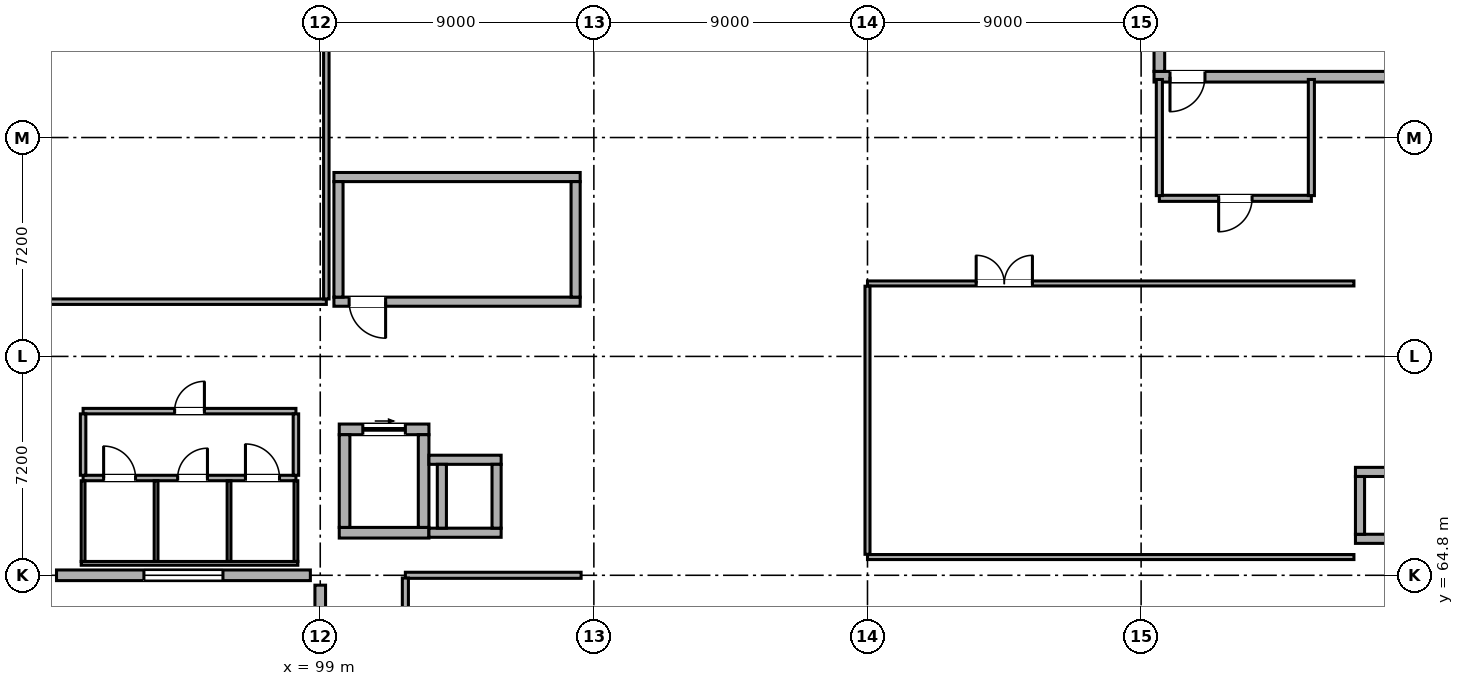
"""IFC4 building model, lengths in metres.
Left out: names, types, materials, properties, quantities, classifications, styles, units other than length and angle.
Written with IfcOpenShell. Run it as: python <this file> out.ifc"""

import sys

from ifc_helpers import new_model, si_unit, direction, frame, frame_2d, origin, origin_2d, place, context, subcontext, project, spatial, rectangle, hollow_rectangle, extrude, element, fill, save


model = new_model("IFC4")
c1 = context("Model", 3, precision=1e-05, world=origin(), true_north=direction((0.0, 1.0)))
c2 = subcontext(c1, "Body", "Model", "MODEL_VIEW")
j1 = project(units=[si_unit("LENGTHUNIT", "METRE"), si_unit("PLANEANGLEUNIT", "RADIAN")], contexts=[c1])
p1 = place(None, origin())
s1 = spatial("IfcSite", under=j1, at=p1, CompositionType="ELEMENT")
p2 = place(p1, origin())
s2 = spatial("IfcBuilding", under=s1, at=p2, CompositionType="ELEMENT")
p3 = place(p2, origin())
s3 = spatial("IfcBuildingStorey", under=s2, at=p3, CompositionType="ELEMENT", Elevation=0.0)
for number, where, z_axis, x_axis in (
    (1, (90.0, 64.8, 0.0), (0.0, 0.0, 1.0), (1.0, 0.0, 0.0)),
    (2, (90.0, 72.0, 0.0), (0.0, 0.0, 1.0), (1.0, 0.0, 0.0)),
    (3, (90.0, 79.2, 0.0), (0.0, 0.0, 1.0), (1.0, 0.0, 0.0)),
    (4, (99.0, 64.8, 0.0), (0.0, 0.0, 1.0), (1.0, 0.0, 0.0)),
    (5, (99.0, 72.0, 0.0), (0.0, 0.0, 1.0), (1.0, 0.0, 0.0)),
    (6, (99.0, 79.2, 0.0), (0.0, 0.0, 1.0), (1.0, 0.0, 0.0)),
):
    element("IfcColumn", number, at=place(p3, frame(where, z_axis=z_axis, x_axis=x_axis)), inside=s3, PredefinedType="COLUMN", context=c2, shape_type="SweptSolid", body=[
        extrude(hollow_rectangle(XDim=0.65, YDim=0.65, WallThickness=0.025, at=origin_2d()), origin(), (0.0, 0.0, 1.0), 4.8),
    ])
for number, where, z_axis, x_axis in (
    (7, (108.0, 64.8, 0.0), (0.0, 0.0, 1.0), (1.0, 0.0, 0.0)),
    (8, (108.0, 72.0, 0.0), (0.0, 0.0, 1.0), (1.0, 0.0, 0.0)),
    (9, (108.0, 79.2, 0.0), (0.0, 0.0, 1.0), (1.0, 0.0, 0.0)),
):
    element("IfcColumn", number, at=place(p3, frame(where, z_axis=z_axis, x_axis=x_axis)), inside=s3, PredefinedType="COLUMN", context=c2, shape_type="SweptSolid", body=[
        extrude(hollow_rectangle(XDim=0.5, YDim=0.5, WallThickness=0.022, at=origin_2d()), origin(), (0.0, 0.0, 1.0), 4.8),
    ])
for number, where, z_axis, x_axis in (
    (10, (117.0, 64.8, 0.0), (0.0, 0.0, 1.0), (1.0, 0.0, 0.0)),
    (11, (117.0, 72.0, 0.0), (0.0, 0.0, 1.0), (1.0, 0.0, 0.0)),
    (12, (117.0, 79.2, 0.0), (0.0, 0.0, 1.0), (1.0, 0.0, 0.0)),
):
    element("IfcColumn", number, at=place(p3, frame(where, z_axis=z_axis, x_axis=x_axis)), inside=s3, PredefinedType="COLUMN", context=c2, shape_type="SweptSolid", body=[
        extrude(hollow_rectangle(XDim=0.7, YDim=0.7, WallThickness=0.028, at=origin_2d()), origin(), (0.0, 0.0, 1.0), 4.8),
    ])
for number, where, z_axis, x_axis in (
    (13, (126.0, 64.8, 0.0), (0.0, 0.0, 1.0), (1.0, 0.0, 0.0)),
    (14, (126.0, 72.0, 0.0), (0.0, 0.0, 1.0), (1.0, 0.0, 0.0)),
    (15, (126.0, 79.2, 0.0), (0.0, 0.0, 1.0), (1.0, 0.0, 0.0)),
):
    element("IfcColumn", number, at=place(p3, frame(where, z_axis=z_axis, x_axis=x_axis)), inside=s3, PredefinedType="COLUMN", context=c2, shape_type="SweptSolid", body=[
        extrude(hollow_rectangle(XDim=0.75, YDim=0.75, WallThickness=0.032, at=origin_2d()), origin(), (0.0, 0.0, 1.0), 4.8),
    ])
p4 = place(p3, frame((90.325, 64.8, 0.0), z_axis=(0.0, 0.0, 1.0), x_axis=(1.0, 0.0, 0.0)))
e16 = element("IfcWall", 16, at=p4, inside=s3, PredefinedType="STANDARD", context=c2, shape_type="SweptSolid", body=[
    extrude(rectangle(XDim=8.35, YDim=0.35, at=frame_2d((4.175, 0.0))), origin(), (0.0, 0.0, 1.0), 4.055),
])
p5 = place(p4, frame((2.875, 0.0, 0.85)))
e17 = element("IfcOpeningElement", 17, at=p5, cuts=e16, PredefinedType="OPENING", context=c2, shape_type="SweptSolid", body=[
    extrude(rectangle(XDim=2.6, YDim=1.6, at=frame_2d((1.3, 0.8))), frame((0.0, 0.187, 0.0), z_axis=(0.0, -1.0, 0.0), x_axis=(1.0, 0.0, 0.0)), (0.0, 0.0, 1.0), 0.374),
])
p6 = place(p3, frame((99.0, 57.925, 0.0), z_axis=(0.0, 0.0, 1.0), x_axis=(0.0, 1.0, 0.0)))
e18 = element("IfcWall", 18, at=p6, inside=s3, PredefinedType="STANDARD", context=c2, shape_type="SweptSolid", body=[
    extrude(rectangle(XDim=6.55, YDim=0.35, at=frame_2d((3.275, 0.0))), origin(), (0.0, 0.0, 1.0), 4.055),
])
p7 = place(p6, frame((1.975, 0.0, 0.85)))
e19 = element("IfcOpeningElement", 19, at=p7, cuts=e18, PredefinedType="OPENING", context=c2, shape_type="SweptSolid", body=[
    extrude(rectangle(XDim=2.6, YDim=1.6, at=frame_2d((1.3, 0.8))), frame((0.0, 0.187, 0.0), z_axis=(0.0, -1.0, 0.0), x_axis=(1.0, 0.0, 0.0)), (0.0, 0.0, 1.0), 0.374),
])
p8 = place(p3, frame((126.425, 81.2, 0.0), z_axis=(0.0, 0.0, 1.0), x_axis=(1.0, 0.0, 0.0)))
e20 = element("IfcWall", 20, at=p8, inside=s3, PredefinedType="SHEAR", context=c2, shape_type="SweptSolid", body=[
    extrude(rectangle(XDim=8.15, YDim=0.35, at=frame_2d((4.075, 0.0))), origin(), (0.0, 0.0, 1.0), 4.555),
])
p9 = place(p8, frame((0.525, 0.0, 0.0)))
e21 = element("IfcOpeningElement", 21, at=p9, cuts=e20, PredefinedType="OPENING", context=c2, shape_type="SweptSolid", body=[
    extrude(rectangle(XDim=1.15, YDim=2.1, at=frame_2d((0.575, 1.05))), frame((0.0, 0.187, 0.0), z_axis=(0.0, -1.0, 0.0), x_axis=(1.0, 0.0, 0.0)), (0.0, 0.0, 1.0), 0.374),
])
p10 = place(p3, frame((126.6, 81.375, 0.0), z_axis=(0.0, 0.0, 1.0), x_axis=(0.0, 1.0, 0.0)))
e22 = element("IfcWall", 22, at=p10, inside=s3, PredefinedType="SHEAR", context=c2, shape_type="SweptSolid", body=[
    extrude(rectangle(XDim=3.55, YDim=0.35, at=frame_2d((1.775, 0.0))), origin(), (0.0, 0.0, 1.0), 4.555),
])
p11 = place(p3, frame((99.45, 73.8, 0.0), z_axis=(0.0, 0.0, 1.0), x_axis=(1.0, 0.0, 0.0)))
e23 = element("IfcWall", 23, at=p11, inside=s3, PredefinedType="SHEAR", context=c2, shape_type="SweptSolid", body=[
    extrude(rectangle(XDim=8.1, YDim=0.3, at=frame_2d((4.05, 0.0))), origin(), (0.0, 0.0, 1.0), 4.555),
])
p12 = place(p11, frame((0.5, 0.0, 0.0)))
e24 = element("IfcOpeningElement", 24, at=p12, cuts=e23, PredefinedType="OPENING", context=c2, shape_type="SweptSolid", body=[
    extrude(rectangle(XDim=1.2, YDim=2.1, at=frame_2d((0.6, 1.05))), frame((0.0, 0.162, 0.0), z_axis=(0.0, -1.0, 0.0), x_axis=(1.0, 0.0, 0.0)), (0.0, 0.0, 1.0), 0.324),
])
p13 = place(p3, frame((99.45, 77.9, 0.0), z_axis=(0.0, 0.0, 1.0), x_axis=(1.0, 0.0, 0.0)))
e25 = element("IfcWall", 25, at=p13, inside=s3, PredefinedType="SHEAR", context=c2, shape_type="SweptSolid", body=[
    extrude(rectangle(XDim=8.1, YDim=0.3, at=frame_2d((4.05, 0.0))), origin(), (0.0, 0.0, 1.0), 4.555),
])
for number, where, z_axis, x_axis in (
    (26, (99.6, 73.95, 0.0), (0.0, 0.0, 1.0), (0.0, 1.0, 0.0)),
    (27, (107.4, 73.95, 0.0), (0.0, 0.0, 1.0), (0.0, 1.0, 0.0)),
):
    element("IfcWall", number, at=place(p3, frame(where, z_axis=z_axis, x_axis=x_axis)), inside=s3, PredefinedType="SHEAR", context=c2, shape_type="SweptSolid", body=[
        extrude(rectangle(XDim=3.8, YDim=0.3, at=frame_2d((1.9, 0.0))), origin(), (0.0, 0.0, 1.0), 4.555),
    ])
p14 = place(p3, frame((99.625, 66.2, 0.0), z_axis=(0.0, 0.0, 1.0), x_axis=(1.0, 0.0, 0.0)))
e28 = element("IfcWall", 28, at=p14, inside=s3, PredefinedType="SHEAR", context=c2, shape_type="SweptSolid", body=[
    extrude(rectangle(XDim=2.95, YDim=0.35, at=frame_2d((1.475, 0.0))), origin(), (0.0, 0.0, 1.0), 4.555),
])
p15 = place(p3, frame((99.625, 69.6, 0.0), z_axis=(0.0, 0.0, 1.0), x_axis=(1.0, 0.0, 0.0)))
e29 = element("IfcWall", 29, at=p15, inside=s3, PredefinedType="SHEAR", context=c2, shape_type="SweptSolid", body=[
    extrude(rectangle(XDim=2.95, YDim=0.35, at=frame_2d((1.475, 0.0))), origin(), (0.0, 0.0, 1.0), 4.555),
])
p16 = place(p15, frame((0.775, 0.0, 0.0)))
e30 = element("IfcOpeningElement", 30, at=p16, cuts=e29, PredefinedType="OPENING", context=c2, shape_type="SweptSolid", body=[
    extrude(rectangle(XDim=1.4, YDim=2.15, at=frame_2d((0.7, 1.075))), frame((0.0, 0.187, 0.0), z_axis=(0.0, -1.0, 0.0), x_axis=(1.0, 0.0, 0.0)), (0.0, 0.0, 1.0), 0.374),
])
for number, where, z_axis, x_axis in (
    (31, (99.8, 66.375, 0.0), (0.0, 0.0, 1.0), (0.0, 1.0, 0.0)),
    (32, (102.4, 66.375, 0.0), (0.0, 0.0, 1.0), (0.0, 1.0, 0.0)),
):
    element("IfcWall", number, at=place(p3, frame(where, z_axis=z_axis, x_axis=x_axis)), inside=s3, PredefinedType="SHEAR", context=c2, shape_type="SweptSolid", body=[
        extrude(rectangle(XDim=3.05, YDim=0.35, at=frame_2d((1.525, 0.0))), origin(), (0.0, 0.0, 1.0), 4.555),
    ])
for number, where, z_axis, x_axis in (
    (33, (133.05, 66.0, 0.0), (0.0, 0.0, 1.0), (1.0, 0.0, 0.0)),
    (34, (133.05, 68.2, 0.0), (0.0, 0.0, 1.0), (1.0, 0.0, 0.0)),
):
    element("IfcWall", number, at=place(p3, frame(where, z_axis=z_axis, x_axis=x_axis)), inside=s3, PredefinedType="SHEAR", context=c2, shape_type="SweptSolid", body=[
        extrude(rectangle(XDim=2.1, YDim=0.3, at=frame_2d((1.05, 0.0))), origin(), (0.0, 0.0, 1.0), 4.555),
    ])
p17 = place(p3, frame((133.2, 66.15, 0.0), z_axis=(0.0, 0.0, 1.0), x_axis=(0.0, 1.0, 0.0)))
e35 = element("IfcWall", 35, at=p17, inside=s3, PredefinedType="SHEAR", context=c2, shape_type="SweptSolid", body=[
    extrude(rectangle(XDim=1.9, YDim=0.3, at=frame_2d((0.95, 0.0))), origin(), (0.0, 0.0, 1.0), 4.555),
])
for number, where, z_axis, x_axis in (
    (36, (102.575, 66.2, 0.0), (0.0, 0.0, 1.0), (1.0, 0.0, 0.0)),
    (37, (102.575, 68.6, 0.0), (0.0, 0.0, 1.0), (1.0, 0.0, 0.0)),
):
    element("IfcWall", number, at=place(p3, frame(where, z_axis=z_axis, x_axis=x_axis)), inside=s3, PredefinedType="SHEAR", context=c2, shape_type="SweptSolid", body=[
        extrude(rectangle(XDim=2.375, YDim=0.3, at=frame_2d((1.188, 0.0))), origin(), (0.0, 0.0, 1.0), 4.555),
    ])
for number, where, z_axis, x_axis in (
    (38, (103.0, 66.35, 0.0), (0.0, 0.0, 1.0), (0.0, 1.0, 0.0)),
    (39, (104.8, 66.35, 0.0), (0.0, 0.0, 1.0), (0.0, 1.0, 0.0)),
):
    element("IfcWall", number, at=place(p3, frame(where, z_axis=z_axis, x_axis=x_axis)), inside=s3, PredefinedType="SHEAR", context=c2, shape_type="SweptSolid", body=[
        extrude(rectangle(XDim=2.1, YDim=0.3, at=frame_2d((1.05, 0.0))), origin(), (0.0, 0.0, 1.0), 4.555),
    ])
p18 = place(p3, frame((91.137, 65.192, 0.0), z_axis=(0.0, 0.0, 1.0), x_axis=(1.0, 0.0, 0.0)))
e40 = element("IfcWall", 40, at=p18, inside=s3, PredefinedType="PARTITIONING", context=c2, shape_type="SweptSolid", body=[
    extrude(rectangle(XDim=7.125, YDim=0.125, at=frame_2d((3.562, 0.0))), origin(), (0.0, 0.0, 1.0), 4.555),
])
p19 = place(p3, frame((126.6, 77.2, 0.0), z_axis=(0.0, 0.0, 1.0), x_axis=(1.0, 0.0, 0.0)))
e41 = element("IfcWall", 41, at=p19, inside=s3, PredefinedType="PARTITIONING", context=c2, shape_type="SweptSolid", body=[
    extrude(rectangle(XDim=5.0, YDim=0.2, at=frame_2d((2.5, 0.0))), origin(), (0.0, 0.0, 1.0), 4.555),
])
p20 = place(p19, frame((1.95, 0.0, 0.0)))
e42 = element("IfcOpeningElement", 42, at=p20, cuts=e41, PredefinedType="OPENING", context=c2, shape_type="SweptSolid", body=[
    extrude(rectangle(XDim=1.1, YDim=2.08, at=frame_2d((0.55, 1.04))), frame((0.0, 0.112, 0.0), z_axis=(0.0, -1.0, 0.0), x_axis=(1.0, 0.0, 0.0)), (0.0, 0.0, 1.0), 0.224),
])
for number, where, z_axis, x_axis in (
    (43, (126.6, 77.29, 0.0), (0.0, 0.0, 1.0), (0.0, 1.0, 0.0)),
    (44, (131.6, 77.29, 0.0), (0.0, 0.0, 1.0), (0.0, 1.0, 0.0)),
):
    element("IfcWall", number, at=place(p3, frame(where, z_axis=z_axis, x_axis=x_axis)), inside=s3, PredefinedType="PARTITIONING", context=c2, shape_type="SweptSolid", body=[
        extrude(rectangle(XDim=3.82, YDim=0.2, at=frame_2d((1.91, 0.0))), origin(), (0.0, 0.0, 1.0), 4.555),
    ])
p21 = place(p3, frame((91.2, 68.0, 0.0), z_axis=(0.0, 0.0, 1.0), x_axis=(1.0, 0.0, 0.0)))
e45 = element("IfcWall", 45, at=p21, inside=s3, PredefinedType="PARTITIONING", context=c2, shape_type="SweptSolid", body=[
    extrude(rectangle(XDim=7.0, YDim=0.18, at=frame_2d((3.5, 0.0))), origin(), (0.0, 0.0, 1.0), 4.555),
])
p22 = place(p21, frame((0.675, 0.0, 0.0)))
e46 = element("IfcOpeningElement", 46, at=p22, cuts=e45, PredefinedType="OPENING", context=c2, shape_type="SweptSolid", body=[
    extrude(rectangle(XDim=1.05, YDim=2.1, at=frame_2d((0.525, 1.05))), frame((0.0, 0.102, 0.0), z_axis=(0.0, -1.0, 0.0), x_axis=(1.0, 0.0, 0.0)), (0.0, 0.0, 1.0), 0.204),
])
p23 = place(p21, frame((3.11, 0.0, 0.0)))
e47 = element("IfcOpeningElement", 47, at=p23, cuts=e45, PredefinedType="OPENING", context=c2, shape_type="SweptSolid", body=[
    extrude(rectangle(XDim=0.98, YDim=2.02, at=frame_2d((0.49, 1.01))), frame((0.0, 0.102, 0.0), z_axis=(0.0, -1.0, 0.0), x_axis=(1.0, 0.0, 0.0)), (0.0, 0.0, 1.0), 0.204),
])
p24 = place(p21, frame((5.34, 0.0, 0.0)))
e48 = element("IfcOpeningElement", 48, at=p24, cuts=e45, PredefinedType="OPENING", context=c2, shape_type="SweptSolid", body=[
    extrude(rectangle(XDim=1.12, YDim=2.08, at=frame_2d((0.56, 1.04))), frame((0.0, 0.102, 0.0), z_axis=(0.0, -1.0, 0.0), x_axis=(1.0, 0.0, 0.0)), (0.0, 0.0, 1.0), 0.204),
])
p25 = place(p3, frame((91.2, 70.2, 0.0), z_axis=(0.0, 0.0, 1.0), x_axis=(1.0, 0.0, 0.0)))
e49 = element("IfcWall", 49, at=p25, inside=s3, PredefinedType="PARTITIONING", context=c2, shape_type="SweptSolid", body=[
    extrude(rectangle(XDim=7.0, YDim=0.18, at=frame_2d((3.5, 0.0))), origin(), (0.0, 0.0, 1.0), 4.555),
])
p26 = place(p25, frame((3.01, 0.0, 0.0)))
e50 = element("IfcOpeningElement", 50, at=p26, cuts=e49, PredefinedType="OPENING", context=c2, shape_type="SweptSolid", body=[
    extrude(rectangle(XDim=0.98, YDim=2.02, at=frame_2d((0.49, 1.01))), frame((0.0, 0.102, 0.0), z_axis=(0.0, -1.0, 0.0), x_axis=(1.0, 0.0, 0.0)), (0.0, 0.0, 1.0), 0.204),
])
for number, where, z_axis, x_axis in (
    (51, (91.2, 68.09, 0.0), (0.0, 0.0, 1.0), (0.0, 1.0, 0.0)),
    (52, (98.2, 68.09, 0.0), (0.0, 0.0, 1.0), (0.0, 1.0, 0.0)),
):
    element("IfcWall", number, at=place(p3, frame(where, z_axis=z_axis, x_axis=x_axis)), inside=s3, PredefinedType="PARTITIONING", context=c2, shape_type="SweptSolid", body=[
        extrude(rectangle(XDim=2.02, YDim=0.18, at=frame_2d((1.01, 0.0))), origin(), (0.0, 0.0, 1.0), 4.555),
    ])
for number, where, z_axis, x_axis in (
    (53, (91.2, 65.255, 0.0), (0.0, 0.0, 1.0), (0.0, 1.0, 0.0)),
    (54, (93.6, 65.255, 0.0), (0.0, 0.0, 1.0), (0.0, 1.0, 0.0)),
    (55, (96.0, 65.255, 0.0), (0.0, 0.0, 1.0), (0.0, 1.0, 0.0)),
    (56, (98.2, 65.255, 0.0), (0.0, 0.0, 1.0), (0.0, 1.0, 0.0)),
):
    element("IfcWall", number, at=place(p3, frame(where, z_axis=z_axis, x_axis=x_axis)), inside=s3, PredefinedType="PARTITIONING", context=c2, shape_type="SweptSolid", body=[
        extrude(rectangle(XDim=2.655, YDim=0.125, at=frame_2d((1.328, 0.0))), origin(), (0.0, 0.0, 1.0), 4.555),
    ])
p27 = place(p3, frame((101.8, 64.8, 0.0), z_axis=(0.0, 0.0, 1.0), x_axis=(1.0, 0.0, 0.0)))
e57 = element("IfcWall", 57, at=p27, inside=s3, PredefinedType="PARTITIONING", context=c2, shape_type="SweptSolid", body=[
    extrude(rectangle(XDim=5.78, YDim=0.2, at=frame_2d((2.89, 0.0))), origin(), (0.0, 0.0, 1.0), 3.835),
])
p28 = place(p3, frame((101.8, 36.09, 0.0), z_axis=(0.0, 0.0, 1.0), x_axis=(0.0, 1.0, 0.0)))
e58 = element("IfcWall", 58, at=p28, inside=s3, PredefinedType="PARTITIONING", context=c2, shape_type="SweptSolid", body=[
    extrude(rectangle(XDim=28.62, YDim=0.2, at=frame_2d((14.31, 0.0))), origin(), (0.0, 0.0, 1.0), 4.555),
])
p29 = place(p28, frame((15.11, 0.0, 0.0)))
e59 = element("IfcOpeningElement", 59, at=p29, cuts=e58, PredefinedType="OPENING", context=c2, shape_type="SweptSolid", body=[
    extrude(rectangle(XDim=1.6, YDim=2.12, at=frame_2d((0.8, 1.06))), frame((0.0, 0.112, 0.0), z_axis=(0.0, -1.0, 0.0), x_axis=(1.0, 0.0, 0.0)), (0.0, 0.0, 1.0), 0.224),
])
p30 = place(p3, frame((62.8, 73.8, 0.0), z_axis=(0.0, 0.0, 1.0), x_axis=(1.0, 0.0, 0.0)))
e60 = element("IfcWall", 60, at=p30, inside=s3, PredefinedType="PARTITIONING", context=c2, shape_type="SweptSolid", body=[
    extrude(rectangle(XDim=36.4, YDim=0.18, at=frame_2d((18.2, 0.0))), origin(), (0.0, 0.0, 1.0), 4.555),
])
p31 = place(p30, frame((12.775, 0.0, 0.0)))
e61 = element("IfcOpeningElement", 61, at=p31, cuts=e60, PredefinedType="OPENING", context=c2, shape_type="SweptSolid", body=[
    extrude(rectangle(XDim=1.85, YDim=2.12, at=frame_2d((0.925, 1.06))), frame((0.0, 0.102, 0.0), z_axis=(0.0, -1.0, 0.0), x_axis=(1.0, 0.0, 0.0)), (0.0, 0.0, 1.0), 0.204),
])
p32 = place(p3, frame((99.2, 73.89, 0.0), z_axis=(0.0, 0.0, 1.0), x_axis=(0.0, 1.0, 0.0)))
e62 = element("IfcWall", 62, at=p32, inside=s3, PredefinedType="PARTITIONING", context=c2, shape_type="SweptSolid", body=[
    extrude(rectangle(XDim=11.42, YDim=0.18, at=frame_2d((5.71, 0.0))), origin(), (0.0, 0.0, 1.0), 3.835),
])
p33 = place(p3, frame((117.0, 65.4, 0.0), z_axis=(0.0, 0.0, 1.0), x_axis=(1.0, 0.0, 0.0)))
e63 = element("IfcWall", 63, at=p33, inside=s3, PredefinedType="PARTITIONING", context=c2, shape_type="SweptSolid", body=[
    extrude(rectangle(XDim=16.0, YDim=0.165, at=frame_2d((8.0, 0.0))), origin(), (0.0, 0.0, 1.0), 4.555),
])
p34 = place(p3, frame((117.0, 74.4, 0.0), z_axis=(0.0, 0.0, 1.0), x_axis=(1.0, 0.0, 0.0)))
e64 = element("IfcWall", 64, at=p34, inside=s3, PredefinedType="PARTITIONING", context=c2, shape_type="SweptSolid", body=[
    extrude(rectangle(XDim=16.0, YDim=0.165, at=frame_2d((8.0, 0.0))), origin(), (0.0, 0.0, 1.0), 4.555),
])
p35 = place(p34, frame((3.575, 0.0, 0.0)))
e65 = element("IfcOpeningElement", 65, at=p35, cuts=e64, PredefinedType="OPENING", context=c2, shape_type="SweptSolid", body=[
    extrude(rectangle(XDim=1.85, YDim=2.12, at=frame_2d((0.925, 1.06))), frame((0.0, 0.094, 0.0), z_axis=(0.0, -1.0, 0.0), x_axis=(1.0, 0.0, 0.0)), (0.0, 0.0, 1.0), 0.189),
])
p36 = place(p3, frame((117.0, 65.49, 0.0), z_axis=(0.0, 0.0, 1.0), x_axis=(0.0, 1.0, 0.0)))
e66 = element("IfcWall", 66, at=p36, inside=s3, PredefinedType="PARTITIONING", context=c2, shape_type="SweptSolid", body=[
    extrude(rectangle(XDim=8.82, YDim=0.165, at=frame_2d((4.41, 0.0))), origin(), (0.0, 0.0, 1.0), 3.835),
])
p37 = place(p5, origin())
e67 = element("IfcWindow", 67, at=p37, inside=s3, PartitioningType="DOUBLE_PANEL_VERTICAL", PredefinedType="WINDOW", context=c2, shape_type="SweptSolid", body=[
    extrude(rectangle(XDim=2.6, YDim=1.6, at=frame_2d((1.3, 0.8))), frame((0.0, 0.03, 0.0), z_axis=(0.0, -1.0, 0.0), x_axis=(1.0, 0.0, 0.0)), (0.0, 0.0, 1.0), 0.06),
])
fill(e17, e67)
p38 = place(p9, frame((1.15, 0.0, 0.0), z_axis=(0.0, 0.0, 1.0), x_axis=(-1.0, 0.0, 0.0)))
e68 = element("IfcDoor", 68, at=p38, inside=s3, OperationType="SINGLE_SWING_RIGHT", PredefinedType="DOOR", context=c2, shape_type="SweptSolid", body=[
    extrude(rectangle(XDim=1.15, YDim=2.1, at=frame_2d((0.575, 1.05))), frame((0.0, 0.025, 0.0), z_axis=(0.0, -1.0, 0.0), x_axis=(1.0, 0.0, 0.0)), (0.0, 0.0, 1.0), 0.05),
])
fill(e21, e68)
p39 = place(p12, frame((1.2, 0.0, 0.0), z_axis=(0.0, 0.0, 1.0), x_axis=(-1.0, 0.0, 0.0)))
e69 = element("IfcDoor", 69, at=p39, inside=s3, OperationType="SINGLE_SWING_LEFT", PredefinedType="DOOR", context=c2, shape_type="SweptSolid", body=[
    extrude(rectangle(XDim=1.2, YDim=2.1, at=frame_2d((0.6, 1.05))), frame((0.0, 0.025, 0.0), z_axis=(0.0, -1.0, 0.0), x_axis=(1.0, 0.0, 0.0)), (0.0, 0.0, 1.0), 0.05),
])
fill(e24, e69)
p40 = place(p16, origin())
e70 = element("IfcDoor", 70, at=p40, inside=s3, OperationType="SLIDING_TO_RIGHT", PredefinedType="DOOR", context=c2, shape_type="SweptSolid", body=[
    extrude(rectangle(XDim=1.4, YDim=2.15, at=frame_2d((0.7, 1.075))), frame((0.0, 0.025, 0.0), z_axis=(0.0, -1.0, 0.0), x_axis=(1.0, 0.0, 0.0)), (0.0, 0.0, 1.0), 0.05),
])
fill(e30, e70)
p41 = place(p20, frame((1.1, 0.0, 0.0), z_axis=(0.0, 0.0, 1.0), x_axis=(-1.0, 0.0, 0.0)))
e71 = element("IfcDoor", 71, at=p41, inside=s3, OperationType="SINGLE_SWING_RIGHT", PredefinedType="DOOR", context=c2, shape_type="SweptSolid", body=[
    extrude(rectangle(XDim=1.1, YDim=2.08, at=frame_2d((0.55, 1.04))), frame((0.0, 0.025, 0.0), z_axis=(0.0, -1.0, 0.0), x_axis=(1.0, 0.0, 0.0)), (0.0, 0.0, 1.0), 0.05),
])
fill(e42, e71)
p42 = place(p26, origin())
e72 = element("IfcDoor", 72, at=p42, inside=s3, OperationType="SINGLE_SWING_RIGHT", PredefinedType="DOOR", context=c2, shape_type="SweptSolid", body=[
    extrude(rectangle(XDim=0.98, YDim=2.02, at=frame_2d((0.49, 1.01))), frame((0.0, 0.025, 0.0), z_axis=(0.0, -1.0, 0.0), x_axis=(1.0, 0.0, 0.0)), (0.0, 0.0, 1.0), 0.05),
])
fill(e50, e72)
p43 = place(p22, origin())
e73 = element("IfcDoor", 73, at=p43, inside=s3, OperationType="SINGLE_SWING_LEFT", PredefinedType="DOOR", context=c2, shape_type="SweptSolid", body=[
    extrude(rectangle(XDim=1.05, YDim=2.1, at=frame_2d((0.525, 1.05))), frame((0.0, 0.025, 0.0), z_axis=(0.0, -1.0, 0.0), x_axis=(1.0, 0.0, 0.0)), (0.0, 0.0, 1.0), 0.05),
])
fill(e46, e73)
p44 = place(p23, origin())
e74 = element("IfcDoor", 74, at=p44, inside=s3, OperationType="SINGLE_SWING_RIGHT", PredefinedType="DOOR", context=c2, shape_type="SweptSolid", body=[
    extrude(rectangle(XDim=0.98, YDim=2.02, at=frame_2d((0.49, 1.01))), frame((0.0, 0.025, 0.0), z_axis=(0.0, -1.0, 0.0), x_axis=(1.0, 0.0, 0.0)), (0.0, 0.0, 1.0), 0.05),
])
fill(e47, e74)
p45 = place(p24, origin())
e75 = element("IfcDoor", 75, at=p45, inside=s3, OperationType="SINGLE_SWING_LEFT", PredefinedType="DOOR", context=c2, shape_type="SweptSolid", body=[
    extrude(rectangle(XDim=1.12, YDim=2.08, at=frame_2d((0.56, 1.04))), frame((0.0, 0.025, 0.0), z_axis=(0.0, -1.0, 0.0), x_axis=(1.0, 0.0, 0.0)), (0.0, 0.0, 1.0), 0.05),
])
fill(e48, e75)
p46 = place(p35, origin())
e76 = element("IfcDoor", 76, at=p46, inside=s3, OperationType="DOUBLE_DOOR_SINGLE_SWING", PredefinedType="DOOR", context=c2, shape_type="SweptSolid", body=[
    extrude(rectangle(XDim=1.85, YDim=2.12, at=frame_2d((0.925, 1.06))), frame((0.0, 0.025, 0.0), z_axis=(0.0, -1.0, 0.0), x_axis=(1.0, 0.0, 0.0)), (0.0, 0.0, 1.0), 0.05),
])
fill(e65, e76)
save(model, sys.argv[1])
